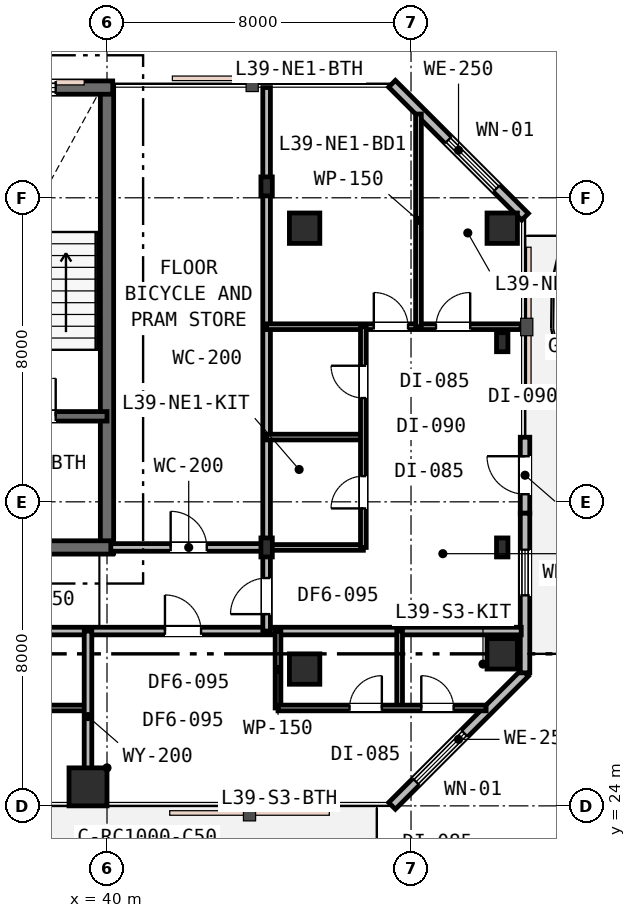
"""IFC4 building model, lengths in metres.
Left out: names, types, materials, properties, quantities, classifications, styles, units other than length and angle.
Written with IfcOpenShell. Run it as: python <this file> out.ifc"""

import sys

from ifc_helpers import new_model, si_unit, direction, frame, frame_2d, origin, origin_2d, place, context, subcontext, project, spatial, rectangle, i_section, extrude, element, fill, save


model = new_model("IFC4")
c1 = context("Model", 3, precision=1e-05, world=origin(), true_north=direction((0.0, 1.0)))
c2 = subcontext(c1, "Body", "Model", "MODEL_VIEW")
j1 = project(units=[si_unit("LENGTHUNIT", "METRE"), si_unit("PLANEANGLEUNIT", "RADIAN")], contexts=[c1])
p1 = place(None, origin())
s1 = spatial("IfcSite", under=j1, at=p1, CompositionType="ELEMENT")
p2 = place(p1, origin())
s2 = spatial("IfcBuilding", under=s1, at=p2, CompositionType="ELEMENT")
p3 = place(p2, frame((0.0, 0.0, 154.2)))
s3 = spatial("IfcBuildingStorey", under=s2, at=p3, CompositionType="ELEMENT", Elevation=154.2)
p4 = place(p3, frame((40.0, 30.65, 0.0), z_axis=(0.0, 0.0, 1.0), x_axis=(0.0, 1.0, 0.0)))
e1 = element("IfcWall", 1, at=p4, inside=s3, PredefinedType="SHEAR", context=c2, shape_type="SweptSolid", body=[
    extrude(rectangle(XDim=12.3, YDim=0.35, at=frame_2d((6.15, 0.0))), origin(), (0.0, 0.0, 1.0), 3.6),
])
p5 = place(p3, frame((15.85, 42.9, 0.0), z_axis=(0.0, 0.0, 1.0), x_axis=(1.0, 0.0, 0.0)))
e2 = element("IfcWall", 2, at=p5, inside=s3, PredefinedType="SHEAR", context=c2, shape_type="SweptSolid", body=[
    extrude(rectangle(XDim=24.3, YDim=0.35, at=frame_2d((12.15, 0.0))), origin(), (0.0, 0.0, 1.0), 3.6),
])
p6 = place(p5, frame((1.6, 0.0, 0.95)))
e3 = element("IfcOpeningElement", 3, at=p6, cuts=e2, PredefinedType="OPENING", context=c2, shape_type="SweptSolid", body=[
    extrude(rectangle(XDim=1.2, YDim=1.6, at=frame_2d((0.6, 0.8))), frame((0.0, 0.185, 0.0), z_axis=(0.0, -1.0, 0.0), x_axis=(1.0, 0.0, 0.0)), (0.0, 0.0, 1.0), 0.37),
])
p7 = place(p5, frame((16.5, 0.0, 0.95)))
e4 = element("IfcOpeningElement", 4, at=p7, cuts=e2, PredefinedType="OPENING", context=c2, shape_type="SweptSolid", body=[
    extrude(rectangle(XDim=1.2, YDim=1.6, at=frame_2d((0.6, 0.8))), frame((0.0, 0.185, 0.0), z_axis=(0.0, -1.0, 0.0), x_axis=(1.0, 0.0, 0.0)), (0.0, 0.0, 1.0), 0.37),
])
p8 = place(p5, frame((21.6, 0.0, 0.95)))
e5 = element("IfcOpeningElement", 5, at=p8, cuts=e2, PredefinedType="OPENING", context=c2, shape_type="SweptSolid", body=[
    extrude(rectangle(XDim=1.2, YDim=1.6, at=frame_2d((0.6, 0.8))), frame((0.0, 0.185, 0.0), z_axis=(0.0, -1.0, 0.0), x_axis=(1.0, 0.0, 0.0)), (0.0, 0.0, 1.0), 0.37),
])
p9 = place(p3, frame((28.95, 30.8, 0.0), z_axis=(0.0, 0.0, 1.0), x_axis=(1.0, 0.0, 0.0)))
e6 = element("IfcWall", 6, at=p9, inside=s3, PredefinedType="SHEAR", context=c2, shape_type="SweptSolid", body=[
    extrude(rectangle(XDim=11.2, YDim=0.35, at=frame_2d((5.6, 0.0))), origin(), (0.0, 0.0, 1.0), 3.6),
])
p10 = place(p9, frame((7.65, 0.0, 0.0)))
e7 = element("IfcOpeningElement", 7, at=p10, cuts=e6, PredefinedType="OPENING", context=c2, shape_type="SweptSolid", body=[
    extrude(rectangle(XDim=1.1, YDim=2.15, at=frame_2d((0.55, 1.075))), frame((0.0, 0.185, 0.0), z_axis=(0.0, -1.0, 0.0), x_axis=(1.0, 0.0, 0.0)), (0.0, 0.0, 1.0), 0.37),
])
p11 = place(p3, frame((33.95, 34.25, 0.0), z_axis=(0.0, 0.0, 1.0), x_axis=(1.0, 0.0, 0.0)))
e8 = element("IfcWall", 8, at=p11, inside=s3, PredefinedType="SHEAR", context=c2, shape_type="SweptSolid", body=[
    extrude(rectangle(XDim=6.05, YDim=0.25, at=frame_2d((3.025, 0.0))), origin(), (0.0, 0.0, 1.0), 3.6),
])
p12 = place(p11, frame((3.7, 0.0, 0.0)))
e9 = element("IfcOpeningElement", 9, at=p12, cuts=e8, PredefinedType="OPENING", context=c2, shape_type="SweptSolid", body=[
    extrude(rectangle(XDim=1.0, YDim=2.15, at=frame_2d((0.5, 1.075))), frame((0.0, 0.135, 0.0), z_axis=(0.0, -1.0, 0.0), x_axis=(1.0, 0.0, 0.0)), (0.0, 0.0, 1.0), 0.27),
])
p13 = place(p11, frame((0.55, 0.0, 0.0)))
e10 = element("IfcOpeningElement", 10, at=p13, cuts=e8, PredefinedType="OPENING", context=c2, shape_type="SweptSolid", body=[
    extrude(rectangle(XDim=1.1, YDim=2.15, at=frame_2d((0.55, 1.075))), frame((0.0, 0.135, 0.0), z_axis=(0.0, -1.0, 0.0), x_axis=(1.0, 0.0, 0.0)), (0.0, 0.0, 1.0), 0.27),
])
p14 = place(p3, frame((39.5, 24.5, 0.0), z_axis=(0.0, 0.0, 1.0), x_axis=(1.0, 0.0, 0.0)))
e11 = element("IfcColumn", 11, at=p14, inside=s3, PredefinedType="COLUMN", context=c2, shape_type="SweptSolid", body=[
    extrude(rectangle(XDim=1.0, YDim=1.0, at=origin_2d()), origin(), (0.0, 0.0, 1.0), 3.6),
])
for number, where, z_axis, x_axis in (
    (12, (45.2, 27.6, 0.0), (0.0, 0.0, 1.0), (1.0, 0.0, 0.0)),
    (13, (45.2, 39.2, 0.0), (0.0, 0.0, 1.0), (1.0, 0.0, 0.0)),
    (14, (50.4, 28.0, 0.0), (0.0, 0.0, 1.0), (1.0, 0.0, 0.0)),
    (15, (50.4, 39.2, 0.0), (0.0, 0.0, 1.0), (1.0, 0.0, 0.0)),
):
    element("IfcColumn", number, at=place(p3, frame(where, z_axis=z_axis, x_axis=x_axis)), inside=s3, PredefinedType="COLUMN", context=c2, shape_type="SweptSolid", body=[
        extrude(rectangle(XDim=0.8, YDim=0.8, at=origin_2d()), origin(), (0.0, 0.0, 1.0), 3.6),
    ])
for number, where, z_axis, x_axis in (
    (16, (44.2, 30.8, 0.0), (0.0, 0.0, 1.0), (1.0, 0.0, 0.0)),
    (17, (44.2, 40.3, 0.0), (0.0, 0.0, 1.0), (1.0, 0.0, 0.0)),
    (18, (50.4, 30.8, 0.0), (0.0, 0.0, 1.0), (1.0, 0.0, 0.0)),
    (19, (50.4, 36.2, 0.0), (0.0, 0.0, 1.0), (1.0, 0.0, 0.0)),
):
    element("IfcColumn", number, at=place(p3, frame(where, z_axis=z_axis, x_axis=x_axis)), inside=s3, PredefinedType="COLUMN", context=c2, shape_type="SweptSolid", body=[
        extrude(i_section(OverallWidth=0.3, OverallDepth=0.5, WebThickness=0.015, FlangeThickness=0.028, FilletRadius=0.027, at=origin_2d()), origin(), (0.0, 0.0, 1.0), 3.6),
    ])
p15 = place(p3, frame((47.5, 24.0, 0.0), z_axis=(0.0, 0.0, 1.0), x_axis=(0.707106781187, 0.707106781187, 0.0)))
e20 = element("IfcWall", 20, at=p15, inside=s3, PredefinedType="STANDARD", context=c2, shape_type="SweptSolid", body=[
    extrude(rectangle(XDim=4.95, YDim=0.25, at=frame_2d((2.475, 0.0))), origin(), (0.0, 0.0, 1.0), 3.33),
])
p16 = place(p15, frame((0.896, 0.0, 0.75)))
e21 = element("IfcOpeningElement", 21, at=p16, cuts=e20, PredefinedType="OPENING", context=c2, shape_type="SweptSolid", body=[
    extrude(rectangle(XDim=1.8, YDim=1.85, at=frame_2d((0.9, 0.925))), frame((0.0, 0.135, 0.0), z_axis=(0.0, -1.0, 0.0), x_axis=(1.0, 0.0, 0.0)), (0.0, 0.0, 1.0), 0.27),
])
p17 = place(p3, frame((51.0, 31.7, 0.0), z_axis=(0.0, 0.0, 1.0), x_axis=(0.0, 1.0, 0.0)))
e22 = element("IfcWall", 22, at=p17, inside=s3, PredefinedType="STANDARD", context=c2, shape_type="SweptSolid", body=[
    extrude(rectangle(XDim=2.0, YDim=0.25, at=frame_2d((1.0, 0.0))), origin(), (0.0, 0.0, 1.0), 3.33),
])
p18 = place(p17, frame((0.5, 0.0, 0.0)))
e23 = element("IfcOpeningElement", 23, at=p18, cuts=e22, PredefinedType="OPENING", context=c2, shape_type="SweptSolid", body=[
    extrude(rectangle(XDim=1.0, YDim=2.15, at=frame_2d((0.5, 1.075))), frame((0.0, 0.135, 0.0), z_axis=(0.0, -1.0, 0.0), x_axis=(1.0, 0.0, 0.0)), (0.0, 0.0, 1.0), 0.27),
])
p19 = place(p3, frame((51.0, 27.5, 0.0), z_axis=(0.0, 0.0, 1.0), x_axis=(0.0, 1.0, 0.0)))
e24 = element("IfcWall", 24, at=p19, inside=s3, PredefinedType="STANDARD", context=c2, shape_type="SweptSolid", body=[
    extrude(rectangle(XDim=4.2, YDim=0.25, at=frame_2d((2.1, 0.0))), origin(), (0.0, 0.0, 1.0), 3.33),
])
p20 = place(p19, frame((2.04, 0.0, 0.85)))
e25 = element("IfcOpeningElement", 25, at=p20, cuts=e24, PredefinedType="OPENING", context=c2, shape_type="SweptSolid", body=[
    extrude(rectangle(XDim=1.2, YDim=1.6, at=frame_2d((0.6, 0.8))), frame((0.0, 0.135, 0.0), z_axis=(0.0, -1.0, 0.0), x_axis=(1.0, 0.0, 0.0)), (0.0, 0.0, 1.0), 0.27),
])
p21 = place(p3, frame((51.0, 39.5, 0.0), z_axis=(0.0, 0.0, 1.0), x_axis=(-0.707106781187, 0.707106781187, 0.0)))
e26 = element("IfcWall", 26, at=p21, inside=s3, PredefinedType="STANDARD", context=c2, shape_type="SweptSolid", body=[
    extrude(rectangle(XDim=4.95, YDim=0.25, at=frame_2d((2.475, 0.0))), origin(), (0.0, 0.0, 1.0), 3.33),
])
p22 = place(p21, frame((1.057, 0.0, 0.75)))
e27 = element("IfcOpeningElement", 27, at=p22, cuts=e26, PredefinedType="OPENING", context=c2, shape_type="SweptSolid", body=[
    extrude(rectangle(XDim=1.8, YDim=1.85, at=frame_2d((0.9, 0.925))), frame((0.0, 0.135, 0.0), z_axis=(0.0, -1.0, 0.0), x_axis=(1.0, 0.0, 0.0)), (0.0, 0.0, 1.0), 0.27),
])
p23 = place(p3, frame((19.6, 28.6, 0.0), z_axis=(0.0, 0.0, 1.0), x_axis=(1.0, 0.0, 0.0)))
e28 = element("IfcWall", 28, at=p23, inside=s3, PredefinedType="PARTITIONING", context=c2, shape_type="SweptSolid", body=[
    extrude(rectangle(XDim=31.3, YDim=0.2, at=frame_2d((15.65, 0.0))), origin(), (0.0, 0.0, 1.0), 2.93),
])
p24 = place(p23, frame((5.445, 0.0, 0.0)))
e29 = element("IfcOpeningElement", 29, at=p24, cuts=e28, PredefinedType="OPENING", context=c2, shape_type="SweptSolid", body=[
    extrude(rectangle(XDim=0.95, YDim=2.15, at=frame_2d((0.475, 1.075))), frame((0.0, 0.11, 0.0), z_axis=(0.0, -1.0, 0.0), x_axis=(1.0, 0.0, 0.0)), (0.0, 0.0, 1.0), 0.22),
])
p25 = place(p23, frame((13.35, 0.0, 0.0)))
e30 = element("IfcOpeningElement", 30, at=p25, cuts=e28, PredefinedType="OPENING", context=c2, shape_type="SweptSolid", body=[
    extrude(rectangle(XDim=0.95, YDim=2.15, at=frame_2d((0.475, 1.075))), frame((0.0, 0.11, 0.0), z_axis=(0.0, -1.0, 0.0), x_axis=(1.0, 0.0, 0.0)), (0.0, 0.0, 1.0), 0.22),
])
p26 = place(p23, frame((21.925, 0.0, 0.0)))
e31 = element("IfcOpeningElement", 31, at=p26, cuts=e28, PredefinedType="OPENING", context=c2, shape_type="SweptSolid", body=[
    extrude(rectangle(XDim=0.95, YDim=2.15, at=frame_2d((0.475, 1.075))), frame((0.0, 0.11, 0.0), z_axis=(0.0, -1.0, 0.0), x_axis=(1.0, 0.0, 0.0)), (0.0, 0.0, 1.0), 0.22),
])
p27 = place(p3, frame((40.1, 30.8, 0.0), z_axis=(0.0, 0.0, 1.0), x_axis=(1.0, 0.0, 0.0)))
e32 = element("IfcWall", 32, at=p27, inside=s3, PredefinedType="PARTITIONING", context=c2, shape_type="SweptSolid", body=[
    extrude(rectangle(XDim=4.1, YDim=0.2, at=frame_2d((2.05, 0.0))), origin(), (0.0, 0.0, 1.0), 2.93),
])
p28 = place(p27, frame((1.575, 0.0, 0.0)))
e33 = element("IfcOpeningElement", 33, at=p28, cuts=e32, PredefinedType="OPENING", context=c2, shape_type="SweptSolid", body=[
    extrude(rectangle(XDim=0.95, YDim=2.15, at=frame_2d((0.475, 1.075))), frame((0.0, 0.11, 0.0), z_axis=(0.0, -1.0, 0.0), x_axis=(1.0, 0.0, 0.0)), (0.0, 0.0, 1.0), 0.22),
])
p29 = place(p3, frame((44.2, 28.6, 0.0), z_axis=(0.0, 0.0, 1.0), x_axis=(0.0, 1.0, 0.0)))
e34 = element("IfcWall", 34, at=p29, inside=s3, PredefinedType="PARTITIONING", context=c2, shape_type="SweptSolid", body=[
    extrude(rectangle(XDim=14.3, YDim=0.2, at=frame_2d((7.15, 0.0))), origin(), (0.0, 0.0, 1.0), 2.93),
])
p30 = place(p29, frame((0.445, 0.0, 0.0)))
e35 = element("IfcOpeningElement", 35, at=p30, cuts=e34, PredefinedType="OPENING", context=c2, shape_type="SweptSolid", body=[
    extrude(rectangle(XDim=0.95, YDim=2.15, at=frame_2d((0.475, 1.075))), frame((0.0, 0.11, 0.0), z_axis=(0.0, -1.0, 0.0), x_axis=(1.0, 0.0, 0.0)), (0.0, 0.0, 1.0), 0.22),
])
for number, where, z_axis, x_axis in (
    (36, (44.2, 30.8, 0.0), (0.0, 0.0, 1.0), (1.0, 0.0, 0.0)),
    (37, (44.2, 33.704, 0.0), (0.0, 0.0, 1.0), (1.0, 0.0, 0.0)),
):
    element("IfcWall", number, at=place(p3, frame(where, z_axis=z_axis, x_axis=x_axis)), inside=s3, PredefinedType="PARTITIONING", context=c2, shape_type="SweptSolid", body=[
        extrude(rectangle(XDim=2.546, YDim=0.15, at=frame_2d((1.273, 0.0))), origin(), (0.0, 0.0, 1.0), 2.93),
    ])
p31 = place(p3, frame((44.2, 36.608, 0.0), z_axis=(0.0, 0.0, 1.0), x_axis=(1.0, 0.0, 0.0)))
e38 = element("IfcWall", 38, at=p31, inside=s3, PredefinedType="PARTITIONING", context=c2, shape_type="SweptSolid", body=[
    extrude(rectangle(XDim=6.7, YDim=0.15, at=frame_2d((3.35, 0.0))), origin(), (0.0, 0.0, 1.0), 2.93),
])
p32 = place(p31, frame((2.821, 0.0, 0.0)))
e39 = element("IfcOpeningElement", 39, at=p32, cuts=e38, PredefinedType="OPENING", context=c2, shape_type="SweptSolid", body=[
    extrude(rectangle(XDim=0.9, YDim=2.15, at=frame_2d((0.45, 1.075))), frame((0.0, 0.085, 0.0), z_axis=(0.0, -1.0, 0.0), x_axis=(1.0, 0.0, 0.0)), (0.0, 0.0, 1.0), 0.17),
])
p33 = place(p31, frame((4.457, 0.0, 0.0)))
e40 = element("IfcOpeningElement", 40, at=p33, cuts=e38, PredefinedType="OPENING", context=c2, shape_type="SweptSolid", body=[
    extrude(rectangle(XDim=0.9, YDim=2.15, at=frame_2d((0.45, 1.075))), frame((0.0, 0.085, 0.0), z_axis=(0.0, -1.0, 0.0), x_axis=(1.0, 0.0, 0.0)), (0.0, 0.0, 1.0), 0.17),
])
p34 = place(p3, frame((46.746, 30.8, 0.0), z_axis=(0.0, 0.0, 1.0), x_axis=(0.0, 1.0, 0.0)))
e41 = element("IfcWall", 41, at=p34, inside=s3, PredefinedType="PARTITIONING", context=c2, shape_type="SweptSolid", body=[
    extrude(rectangle(XDim=5.808, YDim=0.15, at=frame_2d((2.904, 0.0))), origin(), (0.0, 0.0, 1.0), 2.93),
])
p35 = place(p34, frame((1.027, 0.0, 0.0)))
e42 = element("IfcOpeningElement", 42, at=p35, cuts=e41, PredefinedType="OPENING", context=c2, shape_type="SweptSolid", body=[
    extrude(rectangle(XDim=0.85, YDim=2.15, at=frame_2d((0.425, 1.075))), frame((0.0, 0.085, 0.0), z_axis=(0.0, -1.0, 0.0), x_axis=(1.0, 0.0, 0.0)), (0.0, 0.0, 1.0), 0.17),
])
p36 = place(p34, frame((3.931, 0.0, 0.0)))
e43 = element("IfcOpeningElement", 43, at=p36, cuts=e41, PredefinedType="OPENING", context=c2, shape_type="SweptSolid", body=[
    extrude(rectangle(XDim=0.85, YDim=2.15, at=frame_2d((0.425, 1.075))), frame((0.0, 0.085, 0.0), z_axis=(0.0, -1.0, 0.0), x_axis=(1.0, 0.0, 0.0)), (0.0, 0.0, 1.0), 0.17),
])
p37 = place(p3, frame((48.196, 36.608, 0.0), z_axis=(0.0, 0.0, 1.0), x_axis=(0.0, 1.0, 0.0)))
e44 = element("IfcWall", 44, at=p37, inside=s3, PredefinedType="PARTITIONING", context=c2, shape_type="SweptSolid", body=[
    extrude(rectangle(XDim=5.596, YDim=0.15, at=frame_2d((2.798, 0.0))), origin(), (0.0, 0.0, 1.0), 3.01),
])
p38 = place(p3, frame((34.85, 26.576, 0.0), z_axis=(0.0, 0.0, 1.0), x_axis=(1.0, 0.0, 0.0)))
e45 = element("IfcWall", 45, at=p38, inside=s3, PredefinedType="PARTITIONING", context=c2, shape_type="SweptSolid", body=[
    extrude(rectangle(XDim=4.65, YDim=0.15, at=frame_2d((2.325, 0.0))), origin(), (0.0, 0.0, 1.0), 2.93),
])
p39 = place(p38, frame((0.738, 0.0, 0.0)))
e46 = element("IfcOpeningElement", 46, at=p39, cuts=e45, PredefinedType="OPENING", context=c2, shape_type="SweptSolid", body=[
    extrude(rectangle(XDim=0.85, YDim=2.15, at=frame_2d((0.425, 1.075))), frame((0.0, 0.085, 0.0), z_axis=(0.0, -1.0, 0.0), x_axis=(1.0, 0.0, 0.0)), (0.0, 0.0, 1.0), 0.17),
])
p40 = place(p38, frame((2.808, 0.0, 0.0)))
e47 = element("IfcOpeningElement", 47, at=p40, cuts=e45, PredefinedType="OPENING", context=c2, shape_type="SweptSolid", body=[
    extrude(rectangle(XDim=0.85, YDim=2.15, at=frame_2d((0.425, 1.075))), frame((0.0, 0.085, 0.0), z_axis=(0.0, -1.0, 0.0), x_axis=(1.0, 0.0, 0.0)), (0.0, 0.0, 1.0), 0.17),
])
p41 = place(p3, frame((39.5, 24.1, 0.0), z_axis=(0.0, 0.0, 1.0), x_axis=(0.0, 1.0, 0.0)))
e48 = element("IfcWall", 48, at=p41, inside=s3, PredefinedType="PARTITIONING", context=c2, shape_type="SweptSolid", body=[
    extrude(rectangle(XDim=4.5, YDim=0.2, at=frame_2d((2.25, 0.0))), origin(), (0.0, 0.0, 1.0), 2.93),
])
for number, where, z_axis, x_axis in (
    (49, (44.5, 26.576, 0.0), (0.0, 0.0, 1.0), (0.0, 1.0, 0.0)),
    (50, (47.7, 26.576, 0.0), (0.0, 0.0, 1.0), (0.0, 1.0, 0.0)),
):
    element("IfcWall", number, at=place(p3, frame(where, z_axis=z_axis, x_axis=x_axis)), inside=s3, PredefinedType="PARTITIONING", context=c2, shape_type="SweptSolid", body=[
        extrude(rectangle(XDim=2.024, YDim=0.15, at=frame_2d((1.012, 0.0))), origin(), (0.0, 0.0, 1.0), 3.33),
    ])
p42 = place(p3, frame((44.5, 26.576, 0.0), z_axis=(0.0, 0.0, 1.0), x_axis=(1.0, 0.0, 0.0)))
e51 = element("IfcWall", 51, at=p42, inside=s3, PredefinedType="PARTITIONING", context=c2, shape_type="SweptSolid", body=[
    extrude(rectangle(XDim=5.476, YDim=0.15, at=frame_2d((2.738, 0.0))), origin(), (0.0, 0.0, 1.0), 3.33),
])
p43 = place(p42, frame((1.882, 0.0, 0.0)))
e52 = element("IfcOpeningElement", 52, at=p43, cuts=e51, PredefinedType="OPENING", context=c2, shape_type="SweptSolid", body=[
    extrude(rectangle(XDim=0.85, YDim=2.15, at=frame_2d((0.425, 1.075))), frame((0.0, 0.085, 0.0), z_axis=(0.0, -1.0, 0.0), x_axis=(1.0, 0.0, 0.0)), (0.0, 0.0, 1.0), 0.17),
])
p44 = place(p42, frame((3.77, 0.0, 0.0)))
e53 = element("IfcOpeningElement", 53, at=p44, cuts=e51, PredefinedType="OPENING", context=c2, shape_type="SweptSolid", body=[
    extrude(rectangle(XDim=0.85, YDim=2.15, at=frame_2d((0.425, 1.075))), frame((0.0, 0.085, 0.0), z_axis=(0.0, -1.0, 0.0), x_axis=(1.0, 0.0, 0.0)), (0.0, 0.0, 1.0), 0.17),
])
p45 = place(p8, origin())
e54 = element("IfcWindow", 54, at=p45, inside=s3, PartitioningType="SINGLE_PANEL", PredefinedType="WINDOW", context=c2, shape_type="SweptSolid", body=[
    extrude(rectangle(XDim=1.2, YDim=1.6, at=frame_2d((0.6, 0.8))), frame((0.0, 0.03, 0.0), z_axis=(0.0, -1.0, 0.0), x_axis=(1.0, 0.0, 0.0)), (0.0, 0.0, 1.0), 0.06),
])
fill(e5, e54)
p46 = place(p16, origin())
e55 = element("IfcWindow", 55, at=p46, inside=s3, PartitioningType="SINGLE_PANEL", PredefinedType="WINDOW", context=c2, shape_type="SweptSolid", body=[
    extrude(rectangle(XDim=1.8, YDim=1.85, at=frame_2d((0.9, 0.925))), frame((0.0, 0.03, 0.0), z_axis=(0.0, -1.0, 0.0), x_axis=(1.0, 0.0, 0.0)), (0.0, 0.0, 1.0), 0.06),
])
fill(e21, e55)
p47 = place(p18, origin())
e56 = element("IfcDoor", 56, at=p47, inside=s3, OperationType="SINGLE_SWING_RIGHT", PredefinedType="DOOR", context=c2, shape_type="SweptSolid", body=[
    extrude(rectangle(XDim=1.0, YDim=2.15, at=frame_2d((0.5, 1.075))), frame((0.0, 0.025, 0.0), z_axis=(0.0, -1.0, 0.0), x_axis=(1.0, 0.0, 0.0)), (0.0, 0.0, 1.0), 0.05),
])
fill(e23, e56)
p48 = place(p20, origin())
e57 = element("IfcWindow", 57, at=p48, inside=s3, PartitioningType="SINGLE_PANEL", PredefinedType="WINDOW", context=c2, shape_type="SweptSolid", body=[
    extrude(rectangle(XDim=1.2, YDim=1.6, at=frame_2d((0.6, 0.8))), frame((0.0, 0.03, 0.0), z_axis=(0.0, -1.0, 0.0), x_axis=(1.0, 0.0, 0.0)), (0.0, 0.0, 1.0), 0.06),
])
fill(e25, e57)
p49 = place(p22, origin())
e58 = element("IfcWindow", 58, at=p49, inside=s3, PartitioningType="SINGLE_PANEL", PredefinedType="WINDOW", context=c2, shape_type="SweptSolid", body=[
    extrude(rectangle(XDim=1.8, YDim=1.85, at=frame_2d((0.9, 0.925))), frame((0.0, 0.03, 0.0), z_axis=(0.0, -1.0, 0.0), x_axis=(1.0, 0.0, 0.0)), (0.0, 0.0, 1.0), 0.06),
])
fill(e27, e58)
p50 = place(p12, origin())
e59 = element("IfcDoor", 59, at=p50, inside=s3, OperationType="SINGLE_SWING_RIGHT", PredefinedType="DOOR", context=c2, shape_type="SweptSolid", body=[
    extrude(rectangle(XDim=1.0, YDim=2.15, at=frame_2d((0.5, 1.075))), frame((0.0, 0.025, 0.0), z_axis=(0.0, -1.0, 0.0), x_axis=(1.0, 0.0, 0.0)), (0.0, 0.0, 1.0), 0.05),
])
fill(e9, e59)
p51 = place(p28, origin())
e60 = element("IfcDoor", 60, at=p51, inside=s3, OperationType="SINGLE_SWING_LEFT", PredefinedType="DOOR", context=c2, shape_type="SweptSolid", body=[
    extrude(rectangle(XDim=0.95, YDim=2.15, at=frame_2d((0.475, 1.075))), frame((0.0, 0.025, 0.0), z_axis=(0.0, -1.0, 0.0), x_axis=(1.0, 0.0, 0.0)), (0.0, 0.0, 1.0), 0.05),
])
fill(e33, e60)
p52 = place(p30, origin())
e61 = element("IfcDoor", 61, at=p52, inside=s3, OperationType="SINGLE_SWING_LEFT", PredefinedType="DOOR", context=c2, shape_type="SweptSolid", body=[
    extrude(rectangle(XDim=0.95, YDim=2.15, at=frame_2d((0.475, 1.075))), frame((0.0, 0.025, 0.0), z_axis=(0.0, -1.0, 0.0), x_axis=(1.0, 0.0, 0.0)), (0.0, 0.0, 1.0), 0.05),
])
fill(e35, e61)
p53 = place(p35, origin())
e62 = element("IfcDoor", 62, at=p53, inside=s3, OperationType="SINGLE_SWING_LEFT", PredefinedType="DOOR", context=c2, shape_type="SweptSolid", body=[
    extrude(rectangle(XDim=0.85, YDim=2.15, at=frame_2d((0.425, 1.075))), frame((0.0, 0.025, 0.0), z_axis=(0.0, -1.0, 0.0), x_axis=(1.0, 0.0, 0.0)), (0.0, 0.0, 1.0), 0.05),
])
fill(e42, e62)
p54 = place(p36, origin())
e63 = element("IfcDoor", 63, at=p54, inside=s3, OperationType="SINGLE_SWING_RIGHT", PredefinedType="DOOR", context=c2, shape_type="SweptSolid", body=[
    extrude(rectangle(XDim=0.85, YDim=2.15, at=frame_2d((0.425, 1.075))), frame((0.0, 0.025, 0.0), z_axis=(0.0, -1.0, 0.0), x_axis=(1.0, 0.0, 0.0)), (0.0, 0.0, 1.0), 0.05),
])
fill(e43, e63)
p55 = place(p32, origin())
e64 = element("IfcDoor", 64, at=p55, inside=s3, OperationType="SINGLE_SWING_LEFT", PredefinedType="DOOR", context=c2, shape_type="SweptSolid", body=[
    extrude(rectangle(XDim=0.9, YDim=2.15, at=frame_2d((0.45, 1.075))), frame((0.0, 0.025, 0.0), z_axis=(0.0, -1.0, 0.0), x_axis=(1.0, 0.0, 0.0)), (0.0, 0.0, 1.0), 0.05),
])
fill(e39, e64)
p56 = place(p33, origin())
e65 = element("IfcDoor", 65, at=p56, inside=s3, OperationType="SINGLE_SWING_RIGHT", PredefinedType="DOOR", context=c2, shape_type="SweptSolid", body=[
    extrude(rectangle(XDim=0.9, YDim=2.15, at=frame_2d((0.45, 1.075))), frame((0.0, 0.025, 0.0), z_axis=(0.0, -1.0, 0.0), x_axis=(1.0, 0.0, 0.0)), (0.0, 0.0, 1.0), 0.05),
])
fill(e40, e65)
p57 = place(p26, origin())
e66 = element("IfcDoor", 66, at=p57, inside=s3, OperationType="SINGLE_SWING_LEFT", PredefinedType="DOOR", context=c2, shape_type="SweptSolid", body=[
    extrude(rectangle(XDim=0.95, YDim=2.15, at=frame_2d((0.475, 1.075))), frame((0.0, 0.025, 0.0), z_axis=(0.0, -1.0, 0.0), x_axis=(1.0, 0.0, 0.0)), (0.0, 0.0, 1.0), 0.05),
])
fill(e31, e66)
p58 = place(p43, origin())
e67 = element("IfcDoor", 67, at=p58, inside=s3, OperationType="SINGLE_SWING_RIGHT", PredefinedType="DOOR", context=c2, shape_type="SweptSolid", body=[
    extrude(rectangle(XDim=0.85, YDim=2.15, at=frame_2d((0.425, 1.075))), frame((0.0, 0.025, 0.0), z_axis=(0.0, -1.0, 0.0), x_axis=(1.0, 0.0, 0.0)), (0.0, 0.0, 1.0), 0.05),
])
fill(e52, e67)
p59 = place(p44, origin())
e68 = element("IfcDoor", 68, at=p59, inside=s3, OperationType="SINGLE_SWING_LEFT", PredefinedType="DOOR", context=c2, shape_type="SweptSolid", body=[
    extrude(rectangle(XDim=0.85, YDim=2.15, at=frame_2d((0.425, 1.075))), frame((0.0, 0.025, 0.0), z_axis=(0.0, -1.0, 0.0), x_axis=(1.0, 0.0, 0.0)), (0.0, 0.0, 1.0), 0.05),
])
fill(e53, e68)
save(model, sys.argv[1])
